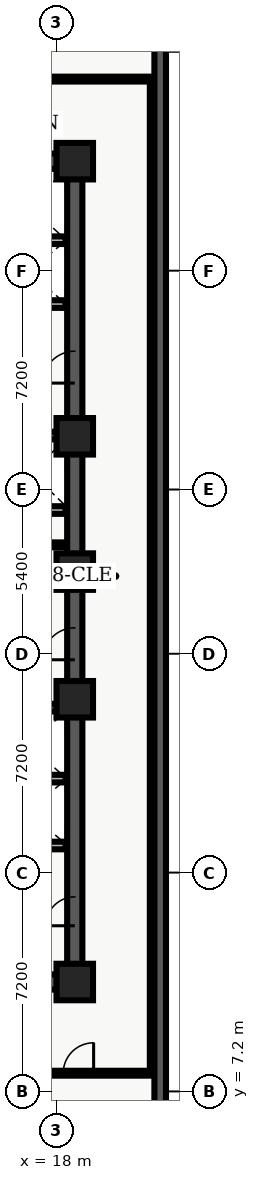
"""IFC4 building model, lengths in metres.
Left out: names, types, materials, properties, quantities, classifications, styles, units other than length and angle.
Written with IfcOpenShell. Run it as: python <this file> out.ifc"""

import sys

from ifc_helpers import new_model, entity, si_unit, converted_unit, direction, frame, origin_with_axes, origin_2d_with_axis, place, context, subcontext, project, spatial, polyline, rectangle, outline, extrude, element, fill, save


model = new_model("IFC4")
c1 = context("Model", 3, precision=1e-05, world=origin_with_axes(), true_north=direction((0.0, 1.0)))
c2 = subcontext(c1, "Body", "Model", "MODEL_VIEW")
j1 = project(units=[si_unit("LENGTHUNIT", "METRE"), converted_unit("PLANEANGLEUNIT", "DEGREE", entity("IfcPlaneAngleMeasure", 0.017), si_unit("PLANEANGLEUNIT", "RADIAN"), dimensions=[0, 0, 0, 0, 0, 0, 0])], contexts=[c1])
p1 = place(None, origin_with_axes())
s1 = spatial("IfcSite", under=j1, at=p1, CompositionType="ELEMENT")
p2 = place(p1, origin_with_axes())
s2 = spatial("IfcBuilding", under=s1, at=p2, CompositionType="ELEMENT")
p3 = place(p2, frame((0.0, 0.0, 116.4), z_axis=(0.0, 0.0, 1.0), x_axis=(1.0, 0.0, 0.0)))
s3 = spatial("IfcBuildingStorey", under=s2, at=p3, CompositionType="ELEMENT", Elevation=116.4)
p4 = place(p3, frame((11.4, 10.8, 0.0), z_axis=(0.0, 0.0, 1.0), x_axis=(1.0, 0.0, 0.0)))
e1 = element("IfcWall", 1, at=p4, inside=s3, PredefinedType="SHEAR", context=c2, shape_type="SweptSolid", body=[
    extrude(outline(polyline([(0.0, -0.25), (7.2, -0.25), (7.2, 0.25), (0.0, 0.25), (0.0, -0.25)])), origin_with_axes(), (0.0, 0.0, 1.0), 3.66),
])
p5 = place(p4, frame((2.625, 0.0, 0.0), z_axis=(0.0, 0.0, 1.0), x_axis=(1.0, 0.0, 0.0)))
e2 = element("IfcOpeningElement", 2, at=p5, cuts=e1, PredefinedType="OPENING", context=c2, shape_type="SweptSolid", body=[
    extrude(rectangle(XDim=1.05, YDim=0.52, at=origin_2d_with_axis()), origin_with_axes(), (0.0, 0.0, 1.0), 2.15),
])
p6 = place(p3, frame((11.4, 37.8, 0.0), z_axis=(0.0, 0.0, 1.0), x_axis=(1.0, 0.0, 0.0)))
e3 = element("IfcWall", 3, at=p6, inside=s3, PredefinedType="SHEAR", context=c2, shape_type="SweptSolid", body=[
    extrude(outline(polyline([(0.0, -0.25), (7.2, -0.25), (7.2, 0.25), (0.0, 0.25), (0.0, -0.25)])), origin_with_axes(), (0.0, 0.0, 1.0), 3.66),
])
p7 = place(p6, frame((2.625, 0.0, 0.0), z_axis=(0.0, 0.0, 1.0), x_axis=(1.0, 0.0, 0.0)))
e4 = element("IfcOpeningElement", 4, at=p7, cuts=e3, PredefinedType="OPENING", context=c2, shape_type="SweptSolid", body=[
    extrude(rectangle(XDim=1.05, YDim=0.52, at=origin_2d_with_axis()), origin_with_axes(), (0.0, 0.0, 1.0), 2.15),
])
p8 = place(p3, frame((18.6, 10.8, 0.0), z_axis=(0.0, 0.0, 1.0), x_axis=(0.0, 1.0, 0.0)))
e5 = element("IfcWall", 5, at=p8, inside=s3, PredefinedType="SHEAR", context=c2, shape_type="SweptSolid", body=[
    extrude(outline(polyline([(0.0, -0.25), (13.5, -0.25), (13.5, 0.25), (0.0, 0.25), (0.0, -0.25)])), origin_with_axes(), (0.0, 0.0, 1.0), 3.66),
])
p9 = place(p8, frame((11.125, 0.0, 0.0), z_axis=(0.0, 0.0, 1.0), x_axis=(1.0, 0.0, 0.0)))
e6 = element("IfcOpeningElement", 6, at=p9, cuts=e5, PredefinedType="OPENING", context=c2, shape_type="SweptSolid", body=[
    extrude(rectangle(XDim=1.05, YDim=0.52, at=origin_2d_with_axis()), origin_with_axes(), (0.0, 0.0, 1.0), 2.15),
])
p10 = place(p8, frame((2.325, 0.0, 0.0), z_axis=(0.0, 0.0, 1.0), x_axis=(1.0, 0.0, 0.0)))
e7 = element("IfcOpeningElement", 7, at=p10, cuts=e5, PredefinedType="OPENING", context=c2, shape_type="SweptSolid", body=[
    extrude(rectangle(XDim=0.95, YDim=0.52, at=origin_2d_with_axis()), origin_with_axes(), (0.0, 0.0, 1.0), 2.15),
])
p11 = place(p3, frame((18.6, 24.3, 0.0), z_axis=(0.0, 0.0, 1.0), x_axis=(0.0, 1.0, 0.0)))
e8 = element("IfcWall", 8, at=p11, inside=s3, PredefinedType="SHEAR", context=c2, shape_type="SweptSolid", body=[
    extrude(outline(polyline([(0.0, -0.25), (13.5, -0.25), (13.5, 0.25), (0.0, 0.25), (0.0, -0.25)])), origin_with_axes(), (0.0, 0.0, 1.0), 3.66),
])
p12 = place(p11, frame((6.725, 0.0, 0.0), z_axis=(0.0, 0.0, 1.0), x_axis=(1.0, 0.0, 0.0)))
e9 = element("IfcOpeningElement", 9, at=p12, cuts=e8, PredefinedType="OPENING", context=c2, shape_type="SweptSolid", body=[
    extrude(rectangle(XDim=1.05, YDim=0.52, at=origin_2d_with_axis()), origin_with_axes(), (0.0, 0.0, 1.0), 2.15),
])
for number, where, z_axis, x_axis in (
    (10, (11.65, 19.825, 0.0), (0.0, 0.0, 1.0), (1.0, 0.0, 0.0)),
    (11, (11.65, 28.775, 0.0), (0.0, 0.0, 1.0), (1.0, 0.0, 0.0)),
):
    element("IfcWall", number, at=place(p3, frame(where, z_axis=z_axis, x_axis=x_axis)), inside=s3, PredefinedType="SHEAR", context=c2, shape_type="SweptSolid", body=[
        extrude(outline(polyline([(0.0, -0.125), (6.7, -0.125), (6.7, 0.125), (0.0, 0.125), (0.0, -0.125)])), origin_with_axes(), (0.0, 0.0, 1.0), 3.66),
    ])
p13 = place(p3, frame((11.7, 24.1, 0.0), z_axis=(0.0, 0.0, 1.0), x_axis=(1.0, 0.0, 0.0)))
e12 = element("IfcWall", 12, at=p13, inside=s3, PredefinedType="SOLIDWALL", context=c2, shape_type="SweptSolid", body=[
    extrude(outline(polyline([(0.0, -0.125), (6.6, -0.125), (6.6, 0.125), (0.0, 0.125), (0.0, -0.125)])), origin_with_axes(), (0.0, 0.0, 1.0), 2.7),
])
p14 = place(p13, frame((3.75, 0.0, 0.0), z_axis=(0.0, 0.0, 1.0), x_axis=(1.0, 0.0, 0.0)))
e13 = element("IfcOpeningElement", 13, at=p14, cuts=e12, PredefinedType="OPENING", context=c2, shape_type="SweptSolid", body=[
    extrude(rectangle(XDim=0.9, YDim=0.27, at=origin_2d_with_axis()), origin_with_axes(), (0.0, 0.0, 1.0), 2.15),
])
p15 = place(p3, frame((11.7, 26.325, 0.0), z_axis=(0.0, 0.0, 1.0), x_axis=(1.0, 0.0, 0.0)))
e14 = element("IfcWall", 14, at=p15, inside=s3, PredefinedType="SOLIDWALL", context=c2, shape_type="SweptSolid", body=[
    extrude(outline(polyline([(0.0, -0.125), (6.6, -0.125), (6.6, 0.125), (0.0, 0.125), (0.0, -0.125)])), origin_with_axes(), (0.0, 0.0, 1.0), 2.7),
])
p16 = place(p15, frame((3.5, 0.0, 0.0), z_axis=(0.0, 0.0, 1.0), x_axis=(1.0, 0.0, 0.0)))
e15 = element("IfcOpeningElement", 15, at=p16, cuts=e14, PredefinedType="OPENING", context=c2, shape_type="SweptSolid", body=[
    extrude(rectangle(XDim=0.9, YDim=0.27, at=origin_2d_with_axis()), origin_with_axes(), (0.0, 0.0, 1.0), 2.15),
])
for number, where, z_axis, x_axis in (
    (16, (18.6, 10.8, 0.0), (0.0, 0.0, 1.0), (1.0, 0.0, 0.0)),
    (17, (18.6, 20.1, 0.0), (0.0, 0.0, 1.0), (1.0, 0.0, 0.0)),
    (18, (18.6, 24.3, 0.0), (0.0, 0.0, 1.0), (1.0, 0.0, 0.0)),
    (19, (18.6, 28.75, 0.0), (0.0, 0.0, 1.0), (1.0, 0.0, 0.0)),
    (20, (18.6, 37.8, 0.0), (0.0, 0.0, 1.0), (1.0, 0.0, 0.0)),
):
    element("IfcColumn", number, at=place(p3, frame(where, z_axis=z_axis, x_axis=x_axis)), inside=s3, PredefinedType="COLUMN", context=c2, shape_type="SweptSolid", body=[
        extrude(rectangle(XDim=1.2, YDim=1.2, at=origin_2d_with_axis()), origin_with_axes(), (0.0, 0.0, 1.0), 3.9),
    ])
p17 = place(p3, frame((14.62, 25.18, 0.0), z_axis=(0.0, 0.0, 1.0), x_axis=(1.0, 0.0, 0.0)))
e21 = element("IfcWall", 21, at=p17, inside=s3, PredefinedType="PARTITIONING", context=c2, shape_type="SweptSolid", body=[
    extrude(outline(polyline([(0.0, -0.08), (3.68, -0.08), (3.68, 0.08), (0.0, 0.08), (0.0, -0.08)])), origin_with_axes(), (0.0, 0.0, 1.0), 2.7),
])
p18 = place(p17, frame((1.95, 0.0, 0.0), z_axis=(0.0, 0.0, 1.0), x_axis=(1.0, 0.0, 0.0)))
e22 = element("IfcOpeningElement", 22, at=p18, cuts=e21, PredefinedType="OPENING", context=c2, shape_type="SweptSolid", body=[
    extrude(rectangle(XDim=0.9, YDim=0.18, at=origin_2d_with_axis()), origin_with_axes(), (0.0, 0.0, 1.0), 2.15),
])
for number, where, z_axis, x_axis in (
    (23, (15.84, 15.29, 0.0), (0.0, 0.0, 1.0), (1.0, 0.0, 0.0)),
    (24, (15.84, 17.49, 0.0), (0.0, 0.0, 1.0), (1.0, 0.0, 0.0)),
    (25, (15.84, 33.1, 0.0), (0.0, 0.0, 1.0), (1.0, 0.0, 0.0)),
    (26, (15.84, 35.2, 0.0), (0.0, 0.0, 1.0), (1.0, 0.0, 0.0)),
):
    element("IfcWall", number, at=place(p3, frame(where, z_axis=z_axis, x_axis=x_axis)), inside=s3, PredefinedType="SOLIDWALL", context=c2, shape_type="SweptSolid", body=[
        extrude(outline(polyline([(0.0, -0.125), (2.46, -0.125), (2.46, 0.125), (0.0, 0.125), (0.0, -0.125)])), origin_with_axes(), (0.0, 0.0, 1.0), 2.7),
    ])
p19 = place(p3, frame((2.6, 7.8, 0.0), z_axis=(0.0, 0.0, 1.0), x_axis=(1.0, 0.0, 0.0)))
e27 = element("IfcWall", 27, at=p19, inside=s3, PredefinedType="PARTITIONING", context=c2, shape_type="SweptSolid", body=[
    extrude(outline(polyline([(0.0, -0.08), (18.625, -0.08), (18.625, 0.08), (0.0, 0.08), (0.0, -0.08)])), origin_with_axes(), (0.0, 0.0, 1.0), 2.7),
])
p20 = place(p19, frame((3.125, 0.0, 0.0), z_axis=(0.0, 0.0, 1.0), x_axis=(1.0, 0.0, 0.0)))
e28 = element("IfcOpeningElement", 28, at=p20, cuts=e27, PredefinedType="OPENING", context=c2, shape_type="SweptSolid", body=[
    extrude(rectangle(XDim=1.0, YDim=0.18, at=origin_2d_with_axis()), origin_with_axes(), (0.0, 0.0, 1.0), 2.15),
])
p21 = place(p19, frame((7.53, 0.0, 0.0), z_axis=(0.0, 0.0, 1.0), x_axis=(1.0, 0.0, 0.0)))
e29 = element("IfcOpeningElement", 29, at=p21, cuts=e27, PredefinedType="OPENING", context=c2, shape_type="SweptSolid", body=[
    extrude(rectangle(XDim=1.0, YDim=0.18, at=origin_2d_with_axis()), origin_with_axes(), (0.0, 0.0, 1.0), 2.15),
])
p22 = place(p19, frame((11.271, 0.0, 0.0), z_axis=(0.0, 0.0, 1.0), x_axis=(1.0, 0.0, 0.0)))
e30 = element("IfcOpeningElement", 30, at=p22, cuts=e27, PredefinedType="OPENING", context=c2, shape_type="SweptSolid", body=[
    extrude(rectangle(XDim=1.0, YDim=0.18, at=origin_2d_with_axis()), origin_with_axes(), (0.0, 0.0, 1.0), 2.15),
])
p23 = place(p19, frame((16.12, 0.0, 0.0), z_axis=(0.0, 0.0, 1.0), x_axis=(1.0, 0.0, 0.0)))
e31 = element("IfcOpeningElement", 31, at=p23, cuts=e27, PredefinedType="OPENING", context=c2, shape_type="SweptSolid", body=[
    extrude(rectangle(XDim=1.0, YDim=0.18, at=origin_2d_with_axis()), origin_with_axes(), (0.0, 0.0, 1.0), 2.15),
])
p24 = place(p3, frame((2.6, 40.5, 0.0), z_axis=(0.0, 0.0, 1.0), x_axis=(1.0, 0.0, 0.0)))
e32 = element("IfcWall", 32, at=p24, inside=s3, PredefinedType="PARTITIONING", context=c2, shape_type="SweptSolid", body=[
    extrude(outline(polyline([(0.0, -0.08), (18.65, -0.08), (18.65, 0.08), (0.0, 0.08), (0.0, -0.08)])), origin_with_axes(), (0.0, 0.0, 1.0), 2.7),
])
p25 = place(p24, frame((8.205, 0.0, 0.0), z_axis=(0.0, 0.0, 1.0), x_axis=(1.0, 0.0, 0.0)))
e33 = element("IfcOpeningElement", 33, at=p25, cuts=e32, PredefinedType="OPENING", context=c2, shape_type="SweptSolid", body=[
    extrude(rectangle(XDim=1.0, YDim=0.18, at=origin_2d_with_axis()), origin_with_axes(), (0.0, 0.0, 1.0), 2.15),
])
p26 = place(p3, frame((21.15, 7.8, 0.0), z_axis=(0.0, 0.0, 1.0), x_axis=(0.0, 1.0, 0.0)))
e34 = element("IfcWall", 34, at=p26, inside=s3, PredefinedType="PARTITIONING", context=c2, shape_type="SweptSolid", body=[
    extrude(outline(polyline([(0.0, -0.08), (32.7, -0.08), (32.7, 0.08), (0.0, 0.08), (0.0, -0.08)])), origin_with_axes(), (0.0, 0.0, 1.0), 2.7),
])
p27 = place(p3, frame((21.41, 45.82, 0.0), z_axis=(0.0, 0.0, 1.0), x_axis=(0.0, -1.0, 0.0)))
e35 = element("IfcWall", 35, at=p27, inside=s3, PredefinedType="SOLIDWALL", context=c2, shape_type="SweptSolid", body=[
    extrude(outline(polyline([(0.0, -0.19), (45.82, -0.19), (45.82, 0.19), (0.0, 0.19), (0.0, -0.19)])), origin_with_axes(), (0.0, 0.0, 1.0), 3.66),
])
p28 = place(p27, frame((3.079, 0.0, 0.45), z_axis=(0.0, 0.0, 1.0), x_axis=(1.0, 0.0, 0.0)))
e36 = element("IfcOpeningElement", 36, at=p28, cuts=e35, PredefinedType="OPENING", context=c2, shape_type="SweptSolid", body=[
    extrude(rectangle(XDim=2.1, YDim=0.4, at=origin_2d_with_axis()), origin_with_axes(), (0.0, 0.0, 1.0), 2.2),
])
p29 = place(p27, frame((42.741, 0.0, 0.45), z_axis=(0.0, 0.0, 1.0), x_axis=(1.0, 0.0, 0.0)))
e37 = element("IfcOpeningElement", 37, at=p29, cuts=e35, PredefinedType="OPENING", context=c2, shape_type="SweptSolid", body=[
    extrude(rectangle(XDim=2.1, YDim=0.4, at=origin_2d_with_axis()), origin_with_axes(), (0.0, 0.0, 1.0), 2.2),
])
p30 = place(p8, frame((11.125, 0.0, 0.0), z_axis=(0.0, 0.0, 1.0), x_axis=(1.0, 0.0, 0.0)))
e38 = element("IfcDoor", 38, at=p30, inside=s3, OperationType="SINGLE_SWING_LEFT", PredefinedType="DOOR", context=c2, shape_type="SweptSolid", body=[
    extrude(rectangle(XDim=1.05, YDim=0.09, at=origin_2d_with_axis()), origin_with_axes(), (0.0, 0.0, 1.0), 2.15),
])
fill(e6, e38)
p31 = place(p8, frame((2.325, 0.0, 0.0), z_axis=(0.0, 0.0, 1.0), x_axis=(1.0, 0.0, 0.0)))
e39 = element("IfcDoor", 39, at=p31, inside=s3, OperationType="SINGLE_SWING_LEFT", PredefinedType="DOOR", context=c2, shape_type="SweptSolid", body=[
    extrude(rectangle(XDim=0.95, YDim=0.09, at=origin_2d_with_axis()), origin_with_axes(), (0.0, 0.0, 1.0), 2.15),
])
fill(e7, e39)
p32 = place(p11, frame((6.725, 0.0, 0.0), z_axis=(0.0, 0.0, 1.0), x_axis=(1.0, 0.0, 0.0)))
e40 = element("IfcDoor", 40, at=p32, inside=s3, OperationType="SINGLE_SWING_LEFT", PredefinedType="DOOR", context=c2, shape_type="SweptSolid", body=[
    extrude(rectangle(XDim=1.05, YDim=0.09, at=origin_2d_with_axis()), origin_with_axes(), (0.0, 0.0, 1.0), 2.15),
])
fill(e9, e40)
p33 = place(p19, frame((16.12, 0.0, 0.0), z_axis=(0.0, 0.0, 1.0), x_axis=(1.0, 0.0, 0.0)))
e41 = element("IfcDoor", 41, at=p33, inside=s3, OperationType="SINGLE_SWING_RIGHT", PredefinedType="DOOR", context=c2, shape_type="SweptSolid", body=[
    extrude(rectangle(XDim=1.0, YDim=0.09, at=origin_2d_with_axis()), origin_with_axes(), (0.0, 0.0, 1.0), 2.15),
])
fill(e31, e41)
save(model, sys.argv[1])
